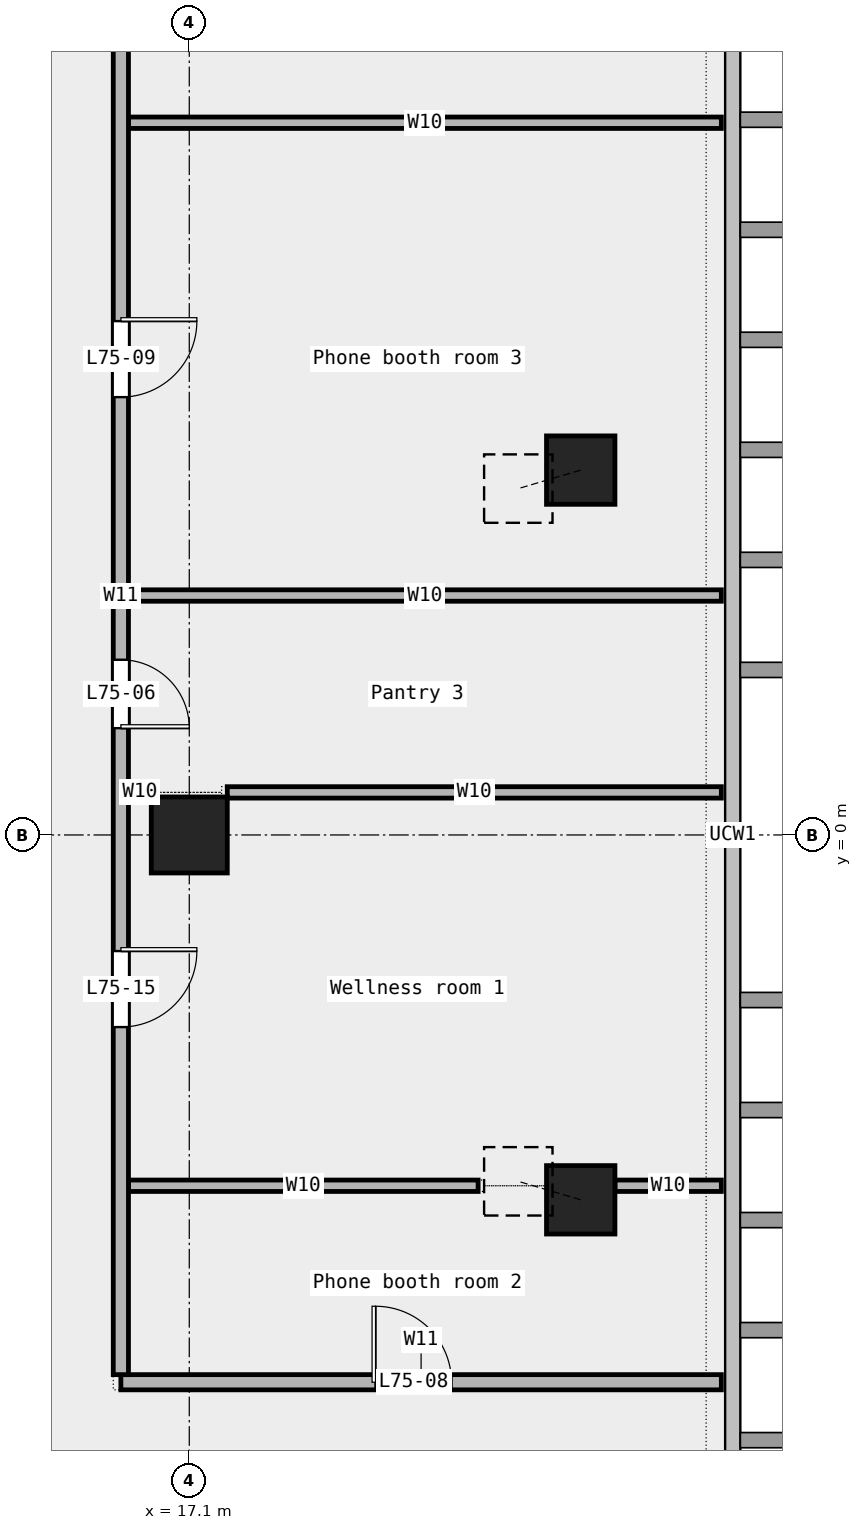
"""IFC4 building model, lengths in metres.
Left out: names, types, materials, properties, quantities, classifications, styles, units other than length and angle.
Written with IfcOpenShell. Run it as: python <this file> out.ifc"""

import sys

from ifc_helpers import new_model, si_unit, direction, frame, frame_2d, origin, origin_2d, place, context, subcontext, project, spatial, rectangle, extrude, element, fill, save


model = new_model("IFC4")
c1 = context("Model", 3, precision=1e-05, world=origin(), true_north=direction((0.0, 1.0)))
c2 = subcontext(c1, "Body", "Model", "MODEL_VIEW")
j1 = project(units=[si_unit("LENGTHUNIT", "METRE"), si_unit("PLANEANGLEUNIT", "RADIAN")], contexts=[c1])
p1 = place(None, origin())
s1 = spatial("IfcSite", under=j1, at=p1, CompositionType="ELEMENT")
p2 = place(p1, origin())
s2 = spatial("IfcBuilding", under=s1, at=p2, CompositionType="ELEMENT")
p3 = place(p2, frame((0.0, 0.0, 345.4)))
s3 = spatial("IfcBuildingStorey", under=s2, at=p3, CompositionType="ELEMENT", Elevation=345.4)
for number, where, z_axis, x_axis in (
    (1, (22.25, -4.8, 0.0), (-0.219, 0.065, 0.974), (-0.284, -0.959, 0.0)),
    (2, (22.25, 4.8, 0.0), (-0.219, -0.065, 0.974), (0.284, -0.959, 0.0)),
):
    element("IfcColumn", number, at=place(p3, frame(where, z_axis=z_axis, x_axis=x_axis)), inside=s3, PredefinedType="COLUMN", context=c2, shape_type="SweptSolid", body=[
        extrude(rectangle(XDim=0.9, YDim=0.9, at=origin_2d()), origin(), (0.0, 0.0, 1.0), 3.749),
    ])
p4 = place(p3, frame((17.1, 0.0, 0.0), z_axis=(0.0, 0.0, 1.0), x_axis=(1.0, 0.0, 0.0)))
e3 = element("IfcColumn", 3, at=p4, inside=s3, PredefinedType="COLUMN", context=c2, shape_type="SweptSolid", body=[
    extrude(rectangle(XDim=1.0, YDim=1.0, at=origin_2d()), origin(), (0.0, 0.0, 1.0), 3.65),
])
p5 = place(p3, frame((16.2, -7.2, 0.0), z_axis=(0.0, 0.0, 1.0), x_axis=(1.0, 0.0, 0.0)))
e4 = element("IfcWall", 4, at=p5, inside=s3, PredefinedType="PARTITIONING", context=c2, shape_type="SweptSolid", body=[
    extrude(rectangle(XDim=7.9, YDim=0.2, at=frame_2d((3.95, 0.0))), origin(), (0.0, 0.0, 1.0), 3.65),
])
p6 = place(p5, frame((3.35, 0.0, 0.0)))
e5 = element("IfcOpeningElement", 5, at=p6, cuts=e4, PredefinedType="OPENING", context=c2, shape_type="SweptSolid", body=[
    extrude(rectangle(XDim=1.0, YDim=2.1, at=frame_2d((0.5, 1.05))), frame((0.0, 0.112, 0.0), z_axis=(0.0, -1.0, 0.0), x_axis=(1.0, 0.0, 0.0)), (0.0, 0.0, 1.0), 0.224),
])
p7 = place(p3, frame((16.3, -4.615, 0.0), z_axis=(0.0, 0.0, 1.0), x_axis=(1.0, 0.0, 0.0)))
e6 = element("IfcWall", 6, at=p7, inside=s3, PredefinedType="PARTITIONING", context=c2, shape_type="SweptSolid", body=[
    extrude(rectangle(XDim=4.6, YDim=0.15, at=frame_2d((2.3, 0.0))), origin(), (0.0, 0.0, 1.0), 3.65),
])
p8 = place(p3, frame((22.7, -4.615, 0.0), z_axis=(0.0, 0.0, 1.0), x_axis=(1.0, 0.0, 0.0)))
e7 = element("IfcWall", 7, at=p8, inside=s3, PredefinedType="PARTITIONING", context=c2, shape_type="SweptSolid", body=[
    extrude(rectangle(XDim=1.4, YDim=0.15, at=frame_2d((0.7, 0.0))), origin(), (0.0, 0.0, 1.0), 3.65),
])
p9 = place(p3, frame((16.3, 0.56, 0.0), z_axis=(0.0, 0.0, 1.0), x_axis=(1.0, 0.0, 0.0)))
e8 = element("IfcWall", 8, at=p9, inside=s3, PredefinedType="PARTITIONING", context=c2, shape_type="SweptSolid", body=[
    extrude(rectangle(XDim=0.3, YDim=0.15, at=frame_2d((0.15, 0.0))), origin(), (0.0, 0.0, 1.0), 3.65),
])
p10 = place(p3, frame((17.6, 0.56, 0.0), z_axis=(0.0, 0.0, 1.0), x_axis=(1.0, 0.0, 0.0)))
e9 = element("IfcWall", 9, at=p10, inside=s3, PredefinedType="PARTITIONING", context=c2, shape_type="SweptSolid", body=[
    extrude(rectangle(XDim=6.5, YDim=0.15, at=frame_2d((3.25, 0.0))), origin(), (0.0, 0.0, 1.0), 3.65),
])
for number, where, z_axis, x_axis in (
    (10, (16.3, 3.15, 0.0), (0.0, 0.0, 1.0), (1.0, 0.0, 0.0)),
    (11, (16.3, 9.37, 0.0), (0.0, 0.0, 1.0), (1.0, 0.0, 0.0)),
):
    element("IfcWall", number, at=place(p3, frame(where, z_axis=z_axis, x_axis=x_axis)), inside=s3, PredefinedType="PARTITIONING", context=c2, shape_type="SweptSolid", body=[
        extrude(rectangle(XDim=7.8, YDim=0.15, at=frame_2d((3.9, 0.0))), origin(), (0.0, 0.0, 1.0), 3.65),
    ])
p11 = place(p3, frame((16.2, -7.1, 0.0), z_axis=(0.0, 0.0, 1.0), x_axis=(0.0, 1.0, 0.0)))
e12 = element("IfcWall", 12, at=p11, inside=s3, PredefinedType="PARTITIONING", context=c2, shape_type="SweptSolid", body=[
    extrude(rectangle(XDim=20.5, YDim=0.2, at=frame_2d((10.25, 0.0))), origin(), (0.0, 0.0, 1.0), 3.65),
])
p12 = place(p11, frame((8.505, 0.0, 0.0)))
e13 = element("IfcOpeningElement", 13, at=p12, cuts=e12, PredefinedType="OPENING", context=c2, shape_type="SweptSolid", body=[
    extrude(rectangle(XDim=0.9, YDim=2.1, at=frame_2d((0.45, 1.05))), frame((0.0, 0.112, 0.0), z_axis=(0.0, -1.0, 0.0), x_axis=(1.0, 0.0, 0.0)), (0.0, 0.0, 1.0), 0.224),
])
p13 = place(p11, frame((12.86, 0.0, 0.0)))
e14 = element("IfcOpeningElement", 14, at=p13, cuts=e12, PredefinedType="OPENING", context=c2, shape_type="SweptSolid", body=[
    extrude(rectangle(XDim=1.0, YDim=2.1, at=frame_2d((0.5, 1.05))), frame((0.0, 0.112, 0.0), z_axis=(0.0, -1.0, 0.0), x_axis=(1.0, 0.0, 0.0)), (0.0, 0.0, 1.0), 0.224),
])
p14 = place(p11, frame((4.573, 0.0, 0.0)))
e15 = element("IfcOpeningElement", 15, at=p14, cuts=e12, PredefinedType="OPENING", context=c2, shape_type="SweptSolid", body=[
    extrude(rectangle(XDim=1.0, YDim=2.1, at=frame_2d((0.5, 1.05))), frame((0.0, 0.112, 0.0), z_axis=(0.0, -1.0, 0.0), x_axis=(1.0, 0.0, 0.0)), (0.0, 0.0, 1.0), 0.224),
])
p15 = place(p12, origin())
e16 = element("IfcDoor", 16, at=p15, inside=s3, OperationType="SINGLE_SWING_RIGHT", PredefinedType="DOOR", context=c2, shape_type="SweptSolid", body=[
    extrude(rectangle(XDim=0.9, YDim=2.1, at=frame_2d((0.45, 1.05))), frame((0.0, 0.025, 0.0), z_axis=(0.0, -1.0, 0.0), x_axis=(1.0, 0.0, 0.0)), (0.0, 0.0, 1.0), 0.05),
])
fill(e13, e16)
p16 = place(p6, origin())
e17 = element("IfcDoor", 17, at=p16, inside=s3, OperationType="SINGLE_SWING_LEFT", PredefinedType="DOOR", context=c2, shape_type="SweptSolid", body=[
    extrude(rectangle(XDim=1.0, YDim=2.1, at=frame_2d((0.5, 1.05))), frame((0.0, 0.025, 0.0), z_axis=(0.0, -1.0, 0.0), x_axis=(1.0, 0.0, 0.0)), (0.0, 0.0, 1.0), 0.05),
])
fill(e5, e17)
p17 = place(p13, origin())
e18 = element("IfcDoor", 18, at=p17, inside=s3, OperationType="SINGLE_SWING_LEFT", PredefinedType="DOOR", context=c2, shape_type="SweptSolid", body=[
    extrude(rectangle(XDim=1.0, YDim=2.1, at=frame_2d((0.5, 1.05))), frame((0.0, 0.025, 0.0), z_axis=(0.0, -1.0, 0.0), x_axis=(1.0, 0.0, 0.0)), (0.0, 0.0, 1.0), 0.05),
])
fill(e14, e18)
p18 = place(p14, origin())
e19 = element("IfcDoor", 19, at=p18, inside=s3, OperationType="SINGLE_SWING_LEFT", PredefinedType="DOOR", context=c2, shape_type="SweptSolid", body=[
    extrude(rectangle(XDim=1.0, YDim=2.1, at=frame_2d((0.5, 1.05))), frame((0.0, 0.025, 0.0), z_axis=(0.0, -1.0, 0.0), x_axis=(1.0, 0.0, 0.0)), (0.0, 0.0, 1.0), 0.05),
])
fill(e15, e19)
save(model, sys.argv[1])
